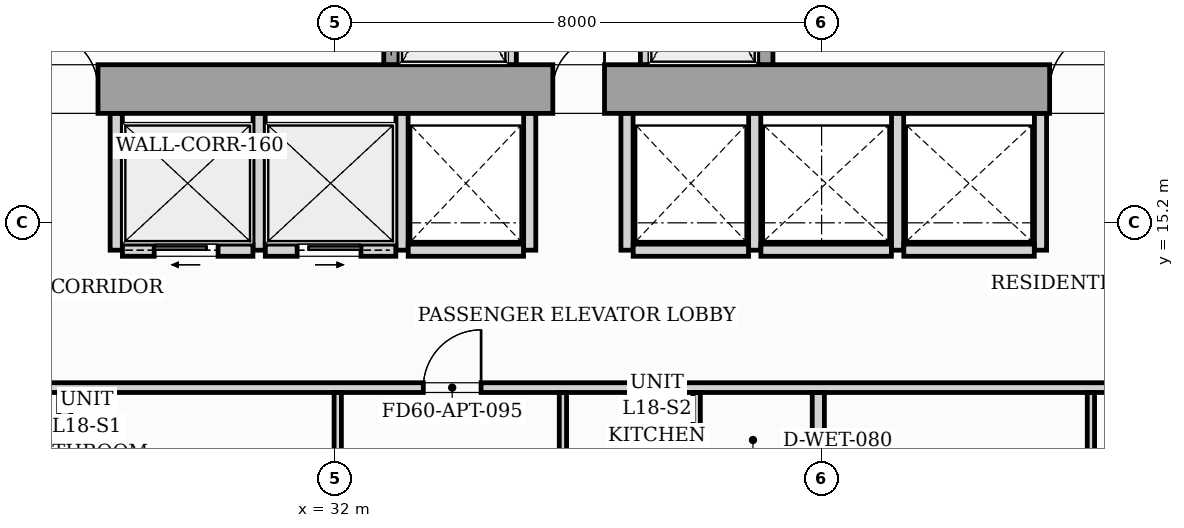
"""IFC4 building model, lengths in metres.
Left out: names, types, materials, properties, quantities, classifications, styles, units other than length and angle.
Written with IfcOpenShell. Run it as: python <this file> out.ifc"""

import sys

from ifc_helpers import new_model, si_unit, direction, frame, frame_2d, origin, origin_2d, place, context, subcontext, project, spatial, rectangle, i_section, extrude, source, transform, mapped, element, fill, save


model = new_model("IFC4")
c1 = context("Model", 3, precision=1e-05, world=origin(), true_north=direction((0.0, 1.0)))
c2 = subcontext(c1, "Body", "Model", "MODEL_VIEW")
j1 = project(units=[si_unit("LENGTHUNIT", "METRE"), si_unit("PLANEANGLEUNIT", "RADIAN")], contexts=[c1])
p1 = place(None, origin())
s1 = spatial("IfcSite", under=j1, at=p1, CompositionType="ELEMENT")
p2 = place(p1, origin())
s2 = spatial("IfcBuilding", under=s1, at=p2, CompositionType="ELEMENT")
p3 = place(p2, frame((0.0, 0.0, 64.6)))
s3 = spatial("IfcBuildingStorey", under=s2, at=p3, CompositionType="ELEMENT", Elevation=64.6)
m1 = source(origin(), c2, "Body", "SweptSolid", [
    extrude(i_section(OverallWidth=0.437, OverallDepth=0.514, WebThickness=0.061, FlangeThickness=0.097, FilletRadius=0.018, at=origin_2d()), origin(), (0.0, 0.0, 1.0), 3.196),
])
for number, where, z_axis, x_axis in (
    (1, (33.12, 17.4, 0.002), (0.0, 0.0, 1.0), (1.0, 0.0, 0.0)),
    (2, (38.88, 17.4, 0.002), (0.0, 0.0, 1.0), (1.0, 0.0, 0.0)),
):
    element("IfcColumn", number, at=place(p3, frame(where, z_axis=z_axis, x_axis=x_axis)), inside=s3, PredefinedType="PILASTER", context=c2, shape_type="MappedRepresentation", body=[
        mapped(m1, transform((0.0, 0.0, 0.0), scale=1.0)),
    ])
p4 = place(p3, frame((26.0, 17.4, 0.0), z_axis=(0.0, 0.0, 1.0), x_axis=(1.0, 0.0, 0.0)))
e3 = element("IfcWall", 3, at=p4, inside=s3, PredefinedType="SHEAR", context=c2, shape_type="SweptSolid", body=[
    extrude(rectangle(XDim=20.0, YDim=0.8, at=frame_2d((10.0, 0.0))), origin(), (0.0, 0.0, 1.0), 3.2),
])
p5 = place(p4, frame((1.15, 0.0, 0.0)))
e4 = element("IfcOpeningElement", 4, at=p5, cuts=e3, PredefinedType="OPENING", context=c2, shape_type="SweptSolid", body=[
    extrude(rectangle(XDim=0.95, YDim=2.06, at=frame_2d((0.475, 1.03))), frame((0.0, 0.41, 0.0), z_axis=(0.0, -1.0, 0.0), x_axis=(1.0, 0.0, 0.0)), (0.0, 0.0, 1.0), 0.82),
])
p6 = place(p4, frame((9.58, 0.0, 0.0)))
e5 = element("IfcOpeningElement", 5, at=p6, cuts=e3, PredefinedType="OPENING", context=c2, shape_type="SweptSolid", body=[
    extrude(rectangle(XDim=0.85, YDim=2.0, at=frame_2d((0.425, 1.0))), frame((0.0, 0.41, 0.0), z_axis=(0.0, -1.0, 0.0), x_axis=(1.0, 0.0, 0.0)), (0.0, 0.0, 1.0), 0.82),
])
p7 = place(p4, frame((17.75, 0.0, 0.0)))
e6 = element("IfcOpeningElement", 6, at=p7, cuts=e3, PredefinedType="OPENING", context=c2, shape_type="SweptSolid", body=[
    extrude(rectangle(XDim=0.95, YDim=2.06, at=frame_2d((0.475, 1.03))), frame((0.0, 0.41, 0.0), z_axis=(0.0, -1.0, 0.0), x_axis=(1.0, 0.0, 0.0)), (0.0, 0.0, 1.0), 0.82),
])
p8 = place(p3, frame((32.925, 17.802, 0.0), z_axis=(0.0, 0.0, 1.0), x_axis=(0.0, 1.0, 0.0)))
e7 = element("IfcWall", 7, at=p8, inside=s3, PredefinedType="SOLIDWALL", context=c2, shape_type="SweptSolid", body=[
    extrude(rectangle(XDim=2.646, YDim=0.25, at=frame_2d((1.323, 0.0))), origin(), (0.0, 0.0, 1.0), 3.2),
])
p9 = place(p8, frame((0.648, 0.0, 0.0)))
e8 = element("IfcOpeningElement", 8, at=p9, cuts=e7, PredefinedType="OPENING", context=c2, shape_type="SweptSolid", body=[
    extrude(rectangle(XDim=1.1, YDim=2.08, at=frame_2d((0.55, 1.04))), frame((0.0, 0.135, 0.0), z_axis=(0.0, -1.0, 0.0), x_axis=(1.0, 0.0, 0.0)), (0.0, 0.0, 1.0), 0.27),
])
for number, where, z_axis, x_axis in (
    (9, (34.9, 17.802, 0.0), (0.0, 0.0, 1.0), (0.0, 1.0, 0.0)),
    (10, (37.1, 17.802, 0.0), (0.0, 0.0, 1.0), (0.0, 1.0, 0.0)),
):
    element("IfcWall", number, at=place(p3, frame(where, z_axis=z_axis, x_axis=x_axis)), inside=s3, PredefinedType="PARTITIONING", context=c2, shape_type="SweptSolid", body=[
        extrude(rectangle(XDim=2.646, YDim=0.16, at=frame_2d((1.323, 0.0))), origin(), (0.0, 0.0, 1.0), 2.9),
    ])
p10 = place(p3, frame((39.075, 17.802, 0.0), z_axis=(0.0, 0.0, 1.0), x_axis=(0.0, 1.0, 0.0)))
e11 = element("IfcWall", 11, at=p10, inside=s3, PredefinedType="SOLIDWALL", context=c2, shape_type="SweptSolid", body=[
    extrude(rectangle(XDim=2.646, YDim=0.25, at=frame_2d((1.323, 0.0))), origin(), (0.0, 0.0, 1.0), 3.2),
])
p11 = place(p10, frame((0.648, 0.0, 0.0)))
e12 = element("IfcOpeningElement", 12, at=p11, cuts=e11, PredefinedType="OPENING", context=c2, shape_type="SweptSolid", body=[
    extrude(rectangle(XDim=1.1, YDim=2.08, at=frame_2d((0.55, 1.04))), frame((0.0, 0.135, 0.0), z_axis=(0.0, -1.0, 0.0), x_axis=(1.0, 0.0, 0.0)), (0.0, 0.0, 1.0), 0.27),
])
for number, where, z_axis, x_axis in (
    (13, (28.4, 14.75, 0.0), (0.0, 0.0, 1.0), (0.0, 1.0, 0.0)),
    (14, (30.75, 14.75, 0.0), (0.0, 0.0, 1.0), (0.0, 1.0, 0.0)),
    (15, (33.1, 14.75, 0.0), (0.0, 0.0, 1.0), (0.0, 1.0, 0.0)),
):
    element("IfcWall", number, at=place(p3, frame(where, z_axis=z_axis, x_axis=x_axis)), inside=s3, PredefinedType="PARTITIONING", context=c2, shape_type="SweptSolid", body=[
        extrude(rectangle(XDim=2.248, YDim=0.2, at=frame_2d((1.124, 0.0))), origin(), (0.0, 0.0, 1.0), 2.9),
    ])
p12 = place(p3, frame((28.502, 14.75, 0.0), z_axis=(0.0, 0.0, 1.0), x_axis=(1.0, 0.0, 0.0)))
e16 = element("IfcWall", 16, at=p12, inside=s3, PredefinedType="PARTITIONING", context=c2, shape_type="SweptSolid", body=[
    extrude(rectangle(XDim=2.146, YDim=0.2, at=frame_2d((1.073, 0.0))), origin(), (0.0, 0.0, 1.0), 2.9),
])
p13 = place(p12, frame((0.523, 0.0, 0.0)))
e17 = element("IfcOpeningElement", 17, at=p13, cuts=e16, PredefinedType="OPENING", context=c2, shape_type="SweptSolid", body=[
    extrude(rectangle(XDim=1.05, YDim=2.08, at=frame_2d((0.525, 1.04))), frame((0.0, 0.11, 0.0), z_axis=(0.0, -1.0, 0.0), x_axis=(1.0, 0.0, 0.0)), (0.0, 0.0, 1.0), 0.22),
])
p14 = place(p3, frame((30.852, 14.75, 0.0), z_axis=(0.0, 0.0, 1.0), x_axis=(1.0, 0.0, 0.0)))
e18 = element("IfcWall", 18, at=p14, inside=s3, PredefinedType="PARTITIONING", context=c2, shape_type="SweptSolid", body=[
    extrude(rectangle(XDim=2.146, YDim=0.2, at=frame_2d((1.073, 0.0))), origin(), (0.0, 0.0, 1.0), 2.9),
])
p15 = place(p14, frame((0.523, 0.0, 0.0)))
e19 = element("IfcOpeningElement", 19, at=p15, cuts=e18, PredefinedType="OPENING", context=c2, shape_type="SweptSolid", body=[
    extrude(rectangle(XDim=1.05, YDim=2.08, at=frame_2d((0.525, 1.04))), frame((0.0, 0.11, 0.0), z_axis=(0.0, -1.0, 0.0), x_axis=(1.0, 0.0, 0.0)), (0.0, 0.0, 1.0), 0.22),
])
p16 = place(p3, frame((35.2, 14.75, 0.0), z_axis=(0.0, 0.0, 1.0), x_axis=(0.0, 1.0, 0.0)))
e20 = element("IfcWall", 20, at=p16, inside=s3, PredefinedType="PARTITIONING", context=c2, shape_type="SweptSolid", body=[
    extrude(rectangle(XDim=2.248, YDim=0.2, at=frame_2d((1.124, 0.0))), origin(), (0.0, 0.0, 1.0), 2.9),
])
p17 = place(p3, frame((33.202, 14.75, 0.0), z_axis=(0.0, 0.0, 1.0), x_axis=(1.0, 0.0, 0.0)))
e21 = element("IfcWall", 21, at=p17, inside=s3, PredefinedType="PARTITIONING", context=c2, shape_type="SweptSolid", body=[
    extrude(rectangle(XDim=1.896, YDim=0.2, at=frame_2d((0.948, 0.0))), origin(), (0.0, 0.0, 1.0), 2.9),
])
for number, where, z_axis, x_axis in (
    (22, (36.8, 14.75, 0.0), (0.0, 0.0, 1.0), (0.0, 1.0, 0.0)),
    (23, (38.9, 14.75, 0.0), (0.0, 0.0, 1.0), (0.0, 1.0, 0.0)),
):
    element("IfcWall", number, at=place(p3, frame(where, z_axis=z_axis, x_axis=x_axis)), inside=s3, PredefinedType="PARTITIONING", context=c2, shape_type="SweptSolid", body=[
        extrude(rectangle(XDim=2.248, YDim=0.2, at=frame_2d((1.124, 0.0))), origin(), (0.0, 0.0, 1.0), 2.9),
    ])
p18 = place(p3, frame((36.902, 14.75, 0.0), z_axis=(0.0, 0.0, 1.0), x_axis=(1.0, 0.0, 0.0)))
e24 = element("IfcWall", 24, at=p18, inside=s3, PredefinedType="PARTITIONING", context=c2, shape_type="SweptSolid", body=[
    extrude(rectangle(XDim=1.896, YDim=0.2, at=frame_2d((0.948, 0.0))), origin(), (0.0, 0.0, 1.0), 2.9),
])
for number, where, z_axis, x_axis in (
    (25, (41.25, 14.75, 0.0), (0.0, 0.0, 1.0), (0.0, 1.0, 0.0)),
    (26, (43.6, 14.75, 0.0), (0.0, 0.0, 1.0), (0.0, 1.0, 0.0)),
):
    element("IfcWall", number, at=place(p3, frame(where, z_axis=z_axis, x_axis=x_axis)), inside=s3, PredefinedType="PARTITIONING", context=c2, shape_type="SweptSolid", body=[
        extrude(rectangle(XDim=2.248, YDim=0.2, at=frame_2d((1.124, 0.0))), origin(), (0.0, 0.0, 1.0), 2.9),
    ])
for number, where, z_axis, x_axis in (
    (27, (39.002, 14.75, 0.0), (0.0, 0.0, 1.0), (1.0, 0.0, 0.0)),
    (28, (41.352, 14.75, 0.0), (0.0, 0.0, 1.0), (1.0, 0.0, 0.0)),
):
    element("IfcWall", number, at=place(p3, frame(where, z_axis=z_axis, x_axis=x_axis)), inside=s3, PredefinedType="PARTITIONING", context=c2, shape_type="SweptSolid", body=[
        extrude(rectangle(XDim=2.146, YDim=0.2, at=frame_2d((1.073, 0.0))), origin(), (0.0, 0.0, 1.0), 2.9),
    ])
p19 = place(p3, frame((15.2, 12.49, 0.0), z_axis=(0.0, 0.0, 1.0), x_axis=(1.0, 0.0, 0.0)))
e29 = element("IfcWall", 29, at=p19, inside=s3, PredefinedType="PARTITIONING", context=c2, shape_type="SweptSolid", body=[
    extrude(rectangle(XDim=37.1, YDim=0.16, at=frame_2d((18.55, 0.0))), origin(), (0.0, 0.0, 1.0), 2.9),
])
p20 = place(p19, frame((5.863, 0.0, 0.0)))
e30 = element("IfcOpeningElement", 30, at=p20, cuts=e29, PredefinedType="OPENING", context=c2, shape_type="SweptSolid", body=[
    extrude(rectangle(XDim=0.95, YDim=2.06, at=frame_2d((0.475, 1.03))), frame((0.0, 0.09, 0.0), z_axis=(0.0, -1.0, 0.0), x_axis=(1.0, 0.0, 0.0)), (0.0, 0.0, 1.0), 0.18),
])
p21 = place(p19, frame((18.25, 0.0, 0.0)))
e31 = element("IfcOpeningElement", 31, at=p21, cuts=e29, PredefinedType="OPENING", context=c2, shape_type="SweptSolid", body=[
    extrude(rectangle(XDim=0.95, YDim=2.06, at=frame_2d((0.475, 1.03))), frame((0.0, 0.09, 0.0), z_axis=(0.0, -1.0, 0.0), x_axis=(1.0, 0.0, 0.0)), (0.0, 0.0, 1.0), 0.18),
])
p22 = place(p19, frame((30.63, 0.0, 0.0)))
e32 = element("IfcOpeningElement", 32, at=p22, cuts=e29, PredefinedType="OPENING", context=c2, shape_type="SweptSolid", body=[
    extrude(rectangle(XDim=0.95, YDim=2.06, at=frame_2d((0.475, 1.03))), frame((0.0, 0.09, 0.0), z_axis=(0.0, -1.0, 0.0), x_axis=(1.0, 0.0, 0.0)), (0.0, 0.0, 1.0), 0.18),
])
p23 = place(p3, frame((27.554, 10.302, 0.0), z_axis=(0.0, 0.0, 1.0), x_axis=(0.0, 1.0, 0.0)))
e33 = element("IfcWall", 33, at=p23, inside=s3, PredefinedType="PARTITIONING", context=c2, shape_type="SweptSolid", body=[
    extrude(rectangle(XDim=2.106, YDim=0.2, at=frame_2d((1.053, 0.0))), origin(), (0.0, 0.0, 1.0), 2.9),
])
for number, where, z_axis, x_axis in (
    (34, (35.746, 10.302, 0.0), (0.0, 0.0, 1.0), (0.0, 1.0, 0.0)),
    (35, (37.946, 10.302, 0.0), (0.0, 0.0, 1.0), (0.0, 1.0, 0.0)),
):
    element("IfcWall", number, at=place(p3, frame(where, z_axis=z_axis, x_axis=x_axis)), inside=s3, PredefinedType="PARTITIONING", context=c2, shape_type="SweptSolid", body=[
        extrude(rectangle(XDim=2.106, YDim=0.12, at=frame_2d((1.053, 0.0))), origin(), (0.0, 0.0, 1.0), 2.9),
    ])
p24 = place(p3, frame((32.043, 2.78, 0.0), z_axis=(0.0, 0.0, 1.0), x_axis=(0.0, 1.0, 0.0)))
e36 = element("IfcWall", 36, at=p24, inside=s3, PredefinedType="PARTITIONING", context=c2, shape_type="SweptSolid", body=[
    extrude(rectangle(XDim=9.628, YDim=0.12, at=frame_2d((4.814, 0.0))), origin(), (0.0, 0.0, 1.0), 2.9),
])
p25 = place(p24, frame((4.47, 0.0, 0.0)))
e37 = element("IfcOpeningElement", 37, at=p25, cuts=e36, PredefinedType="OPENING", context=c2, shape_type="SweptSolid", body=[
    extrude(rectangle(XDim=0.85, YDim=2.05, at=frame_2d((0.425, 1.025))), frame((0.0, 0.07, 0.0), z_axis=(0.0, -1.0, 0.0), x_axis=(1.0, 0.0, 0.0)), (0.0, 0.0, 1.0), 0.14),
])
p26 = place(p3, frame((39.946, 10.302, 0.0), z_axis=(0.0, 0.0, 1.0), x_axis=(0.0, 1.0, 0.0)))
e38 = element("IfcWall", 38, at=p26, inside=s3, PredefinedType="PARTITIONING", context=c2, shape_type="SweptSolid", body=[
    extrude(rectangle(XDim=2.106, YDim=0.2, at=frame_2d((1.053, 0.0))), origin(), (0.0, 0.0, 1.0), 2.9),
])
p27 = place(p3, frame((44.429, 2.962, 0.0), z_axis=(0.0, 0.0, 1.0), x_axis=(0.0, 1.0, 0.0)))
e39 = element("IfcWall", 39, at=p27, inside=s3, PredefinedType="PARTITIONING", context=c2, shape_type="SweptSolid", body=[
    extrude(rectangle(XDim=9.446, YDim=0.12, at=frame_2d((4.723, 0.0))), origin(), (0.0, 0.0, 1.0), 2.096),
])
p28 = place(p27, frame((4.288, 0.0, 0.0)))
e40 = element("IfcOpeningElement", 40, at=p28, cuts=e39, PredefinedType="OPENING", context=c2, shape_type="SweptSolid", body=[
    extrude(rectangle(XDim=0.85, YDim=2.01, at=frame_2d((0.425, 1.005))), frame((0.0, 0.07, 0.0), z_axis=(0.0, -1.0, 0.0), x_axis=(1.0, 0.0, 0.0)), (0.0, 0.0, 1.0), 0.14),
])
m2 = source(origin(), c2, "Body", "SweptSolid", [
    extrude(rectangle(XDim=0.95, YDim=2.06, at=frame_2d((0.475, 1.03))), frame((0.0, 0.025, 0.0), z_axis=(0.0, -1.0, 0.0), x_axis=(1.0, 0.0, 0.0)), (0.0, 0.0, 1.0), 0.05),
])
p29 = place(p5, origin())
e41 = element("IfcDoor", 41, at=p29, inside=s3, OperationType="SINGLE_SWING_LEFT", PredefinedType="DOOR", context=c2, shape_type="MappedRepresentation", body=[
    mapped(m2, transform((0.0, 0.0, 0.0), scale=1.0)),
])
fill(e4, e41)
m3 = source(origin(), c2, "Body", "SweptSolid", [
    extrude(rectangle(XDim=0.85, YDim=2.0, at=frame_2d((0.425, 1.0))), frame((0.0, 0.025, 0.0), z_axis=(0.0, -1.0, 0.0), x_axis=(1.0, 0.0, 0.0)), (0.0, 0.0, 1.0), 0.05),
])
p30 = place(p6, origin())
e42 = element("IfcDoor", 42, at=p30, inside=s3, OperationType="SINGLE_SWING_RIGHT", PredefinedType="DOOR", context=c2, shape_type="MappedRepresentation", body=[
    mapped(m3, transform((0.0, 0.0, 0.0), scale=1.0)),
])
fill(e5, e42)
p31 = place(p7, origin())
e43 = element("IfcDoor", 43, at=p31, inside=s3, OperationType="SINGLE_SWING_RIGHT", PredefinedType="DOOR", context=c2, shape_type="MappedRepresentation", body=[
    mapped(m2, transform((0.0, 0.0, 0.0), scale=1.0)),
])
fill(e6, e43)
m4 = source(origin(), c2, "Body", "SweptSolid", [
    extrude(rectangle(XDim=1.05, YDim=2.08, at=frame_2d((0.525, 1.04))), frame((0.0, 0.025, 0.0), z_axis=(0.0, -1.0, 0.0), x_axis=(1.0, 0.0, 0.0)), (0.0, 0.0, 1.0), 0.05),
])
p32 = place(p13, origin())
e44 = element("IfcDoor", 44, at=p32, inside=s3, OperationType="SLIDING_TO_LEFT", PredefinedType="DOOR", context=c2, shape_type="MappedRepresentation", body=[
    mapped(m4, transform((0.0, 0.0, 0.0), scale=1.0)),
])
fill(e17, e44)
p33 = place(p15, origin())
e45 = element("IfcDoor", 45, at=p33, inside=s3, OperationType="SLIDING_TO_RIGHT", PredefinedType="DOOR", context=c2, shape_type="MappedRepresentation", body=[
    mapped(m4, transform((0.0, 0.0, 0.0), scale=1.0)),
])
fill(e19, e45)
m5 = source(origin(), c2, "Body", "SweptSolid", [
    extrude(rectangle(XDim=0.95, YDim=2.06, at=frame_2d((0.475, 1.03))), frame((0.0, 0.025, 0.0), z_axis=(0.0, -1.0, 0.0), x_axis=(1.0, 0.0, 0.0)), (0.0, 0.0, 1.0), 0.05),
])
p34 = place(p21, origin())
e46 = element("IfcDoor", 46, at=p34, inside=s3, OperationType="SINGLE_SWING_RIGHT", PredefinedType="DOOR", context=c2, shape_type="MappedRepresentation", body=[
    mapped(m5, transform((0.0, 0.0, 0.0), scale=1.0)),
])
fill(e31, e46)
save(model, sys.argv[1])
